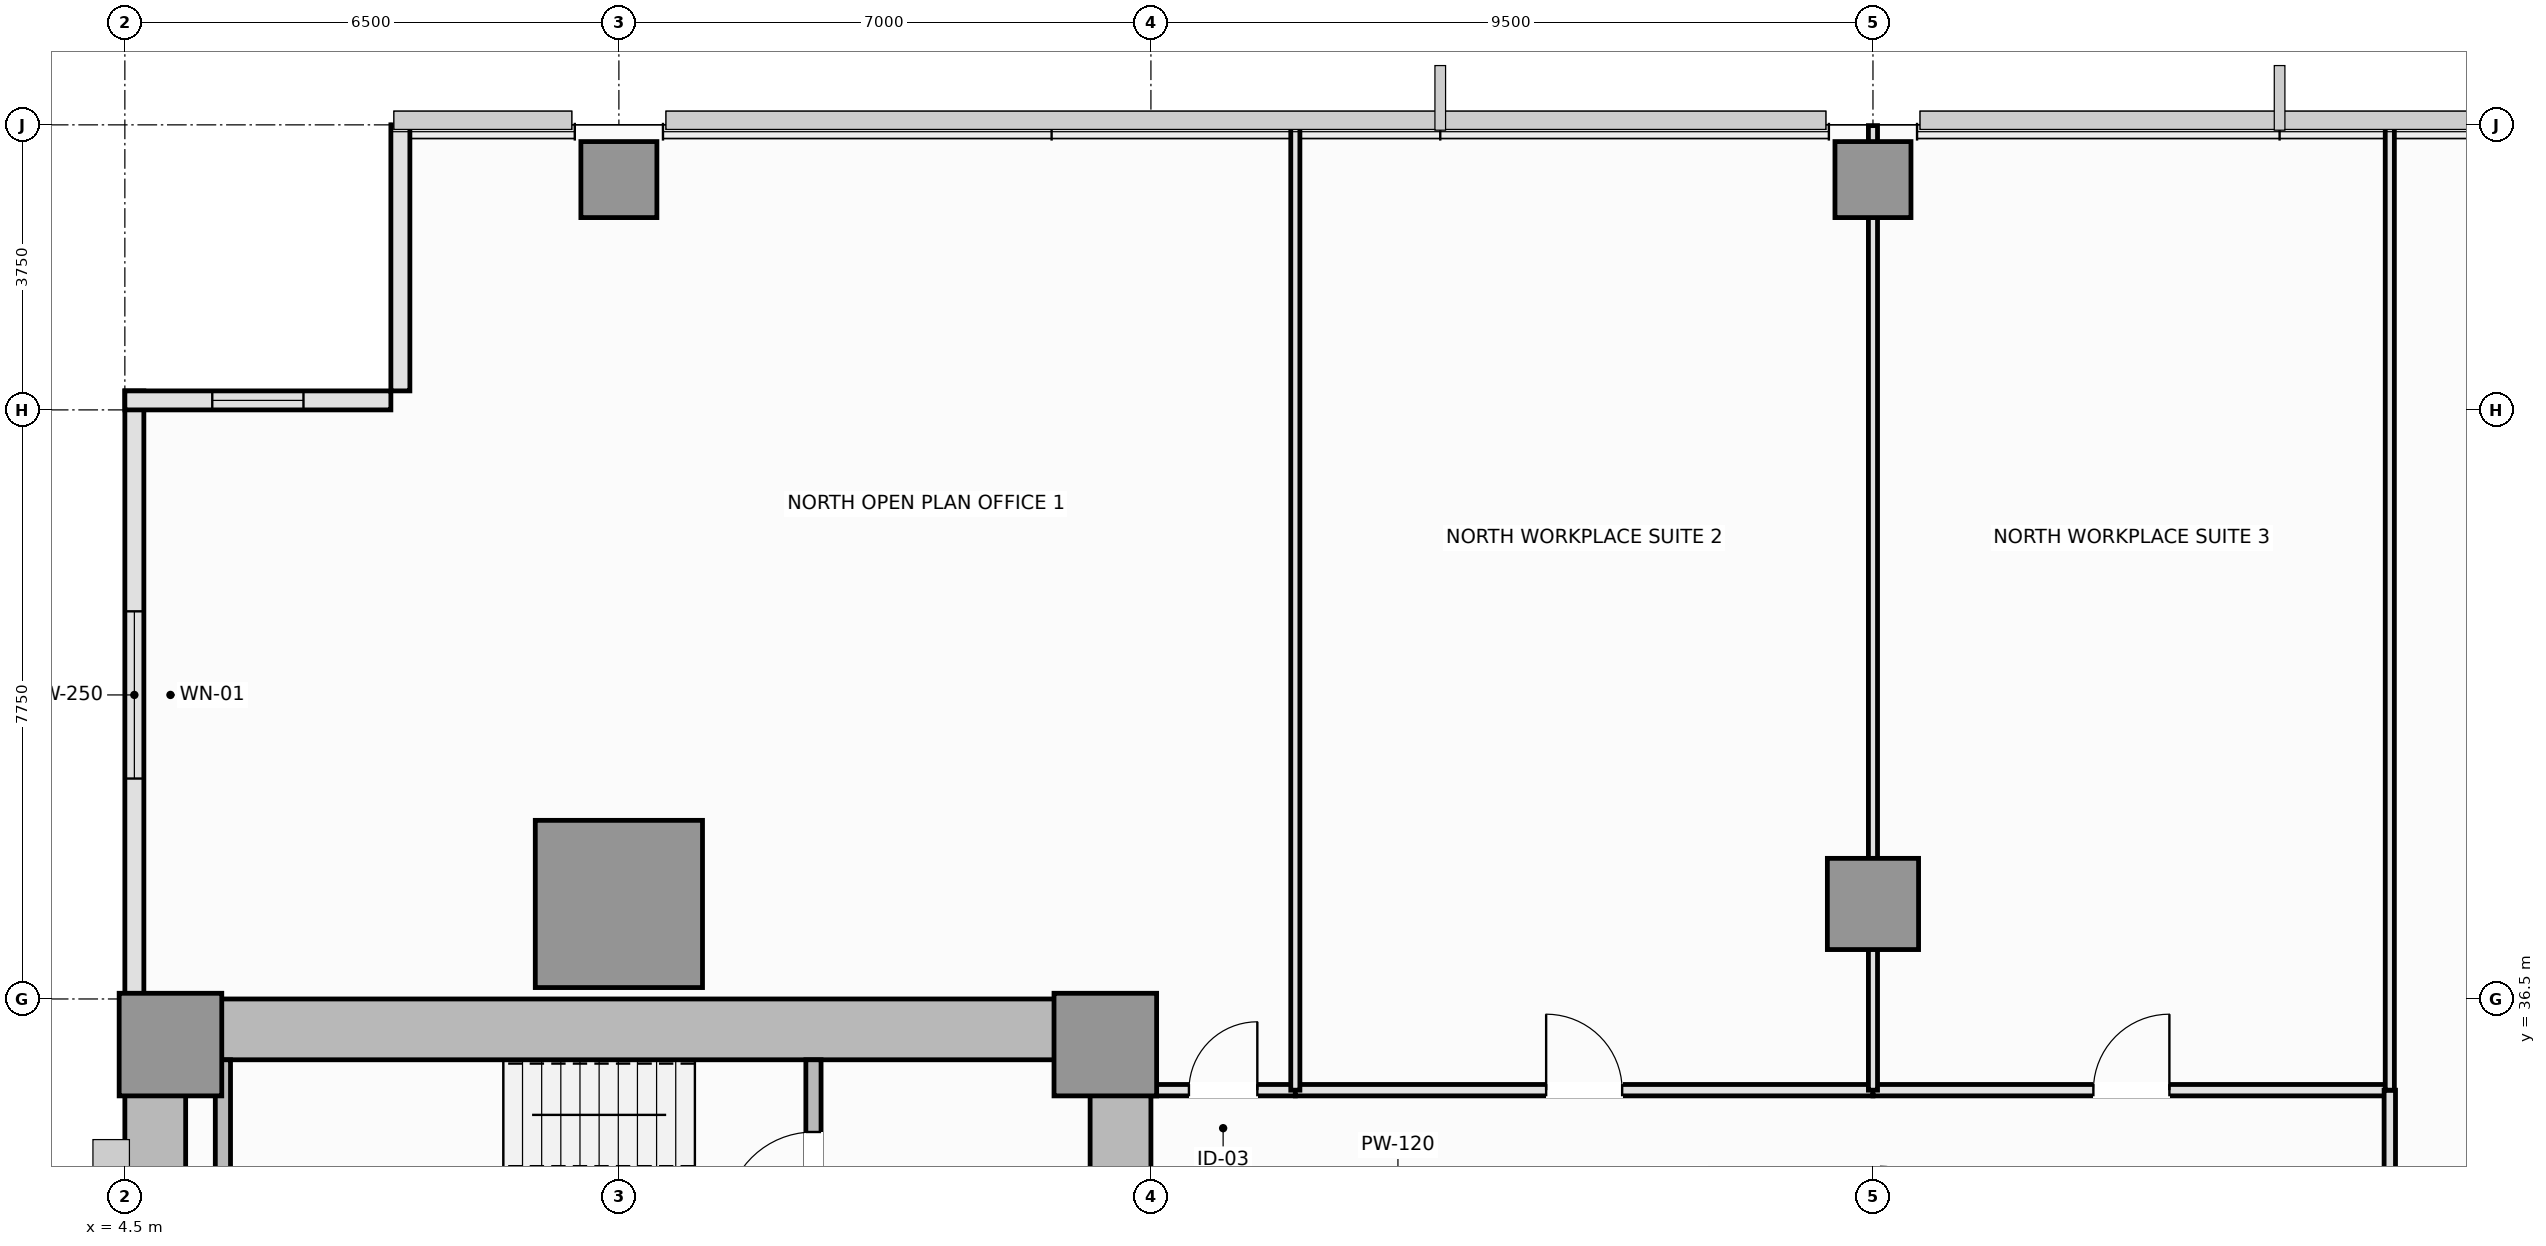
"""IFC4 building model, lengths in metres.
Left out: names, types, materials, properties, quantities, classifications, styles, units other than length and angle.
Written with IfcOpenShell. Run it as: python <this file> out.ifc"""

import sys

from ifc_helpers import new_model, si_unit, direction, frame, frame_2d, origin, origin_2d, place, context, subcontext, project, spatial, rectangle, extrude, element, fill, save


model = new_model("IFC4")
c1 = context("Model", 3, precision=1e-05, world=origin(), true_north=direction((0.0, 1.0)))
c2 = subcontext(c1, "Body", "Model", "MODEL_VIEW")
j1 = project(units=[si_unit("LENGTHUNIT", "METRE"), si_unit("PLANEANGLEUNIT", "RADIAN")], contexts=[c1])
p1 = place(None, origin())
s1 = spatial("IfcSite", under=j1, at=p1, CompositionType="ELEMENT")
p2 = place(p1, origin())
s2 = spatial("IfcBuilding", under=s1, at=p2, CompositionType="ELEMENT")
p3 = place(p2, frame((0.0, 0.0, 36.25)))
s3 = spatial("IfcBuildingStorey", under=s2, at=p3, CompositionType="ELEMENT", Elevation=36.25)
p4 = place(p3, frame((4.5, 36.1, 0.0), z_axis=(0.0, 0.0, 1.0), x_axis=(1.0, 0.0, 0.0)))
e1 = element("IfcWall", 1, at=p4, inside=s3, PredefinedType="SHEAR", context=c2, shape_type="SweptSolid", body=[
    extrude(rectangle(XDim=13.5, YDim=0.8, at=frame_2d((6.75, 0.0))), origin(), (0.0, 0.0, 1.0), 3.55),
])
p5 = place(p3, frame((4.9, 14.8, 0.0), z_axis=(0.0, 0.0, 1.0), x_axis=(0.0, 1.0, 0.0)))
e2 = element("IfcWall", 2, at=p5, inside=s3, PredefinedType="SHEAR", context=c2, shape_type="SweptSolid", body=[
    extrude(rectangle(XDim=20.9, YDim=0.8, at=frame_2d((10.45, 0.0))), origin(), (0.0, 0.0, 1.0), 3.55),
])
p6 = place(p3, frame((17.6, 27.05, 0.0), z_axis=(0.0, 0.0, 1.0), x_axis=(0.0, 1.0, 0.0)))
e3 = element("IfcWall", 3, at=p6, inside=s3, PredefinedType="SHEAR", context=c2, shape_type="SweptSolid", body=[
    extrude(rectangle(XDim=8.65, YDim=0.8, at=frame_2d((4.325, 0.0))), origin(), (0.0, 0.0, 1.0), 3.55),
])
p7 = place(p6, frame((3.45, 0.0, 0.0)))
e4 = element("IfcOpeningElement", 4, at=p7, cuts=e3, PredefinedType="OPENING", context=c2, shape_type="SweptSolid", body=[
    extrude(rectangle(XDim=1.1, YDim=2.15, at=frame_2d((0.55, 1.075))), frame((0.0, 0.41, 0.0), z_axis=(0.0, -1.0, 0.0), x_axis=(1.0, 0.0, 0.0)), (0.0, 0.0, 1.0), 0.82),
])
for number, where, z_axis, x_axis in (
    (5, (5.1, 35.9, 0.0), (0.0, 0.0, 1.0), (1.0, 0.0, 0.0)),
    (6, (17.4, 35.9, 0.0), (0.0, 0.0, 1.0), (1.0, 0.0, 0.0)),
):
    element("IfcColumn", number, at=place(p3, frame(where, z_axis=z_axis, x_axis=x_axis)), inside=s3, PredefinedType="PILASTER", context=c2, shape_type="SweptSolid", body=[
        extrude(rectangle(XDim=1.35, YDim=1.35, at=origin_2d()), origin(), (0.0, 0.0, 1.0), 3.55),
    ])
p8 = place(p3, frame((11.0, 37.75, 0.0), z_axis=(0.0, 0.0, 1.0), x_axis=(1.0, 0.0, 0.0)))
e7 = element("IfcColumn", 7, at=p8, inside=s3, PredefinedType="COLUMN", context=c2, shape_type="SweptSolid", body=[
    extrude(rectangle(XDim=2.2, YDim=2.2, at=origin_2d()), origin(), (0.0, 0.0, 1.0), 3.55),
])
p9 = place(p3, frame((27.5, 37.75, 0.0), z_axis=(0.0, 0.0, 1.0), x_axis=(1.0, 0.0, 0.0)))
e8 = element("IfcColumn", 8, at=p9, inside=s3, PredefinedType="COLUMN", context=c2, shape_type="SweptSolid", body=[
    extrude(rectangle(XDim=1.2, YDim=1.2, at=origin_2d()), origin(), (0.0, 0.0, 1.0), 3.55),
])
for number, where, z_axis, x_axis in (
    (9, (11.0, 47.28, 0.0), (0.0, 0.0, 1.0), (1.0, 0.0, 0.0)),
    (10, (27.5, 47.28, 0.0), (0.0, 0.0, 1.0), (1.0, 0.0, 0.0)),
):
    element("IfcColumn", number, at=place(p3, frame(where, z_axis=z_axis, x_axis=x_axis)), inside=s3, PredefinedType="COLUMN", context=c2, shape_type="SweptSolid", body=[
        extrude(rectangle(XDim=1.0, YDim=1.0, at=origin_2d()), origin(), (0.0, 0.0, 1.0), 3.55),
    ])
p10 = place(p3, frame((4.625, 44.5, 0.0), z_axis=(0.0, 0.0, 1.0), x_axis=(0.0, -1.0, 0.0)))
e11 = element("IfcWall", 11, at=p10, inside=s3, PredefinedType="SOLIDWALL", context=c2, shape_type="SweptSolid", body=[
    extrude(rectangle(XDim=8.0, YDim=0.25, at=frame_2d((4.0, 0.0))), origin(), (0.0, 0.0, 1.0), 3.37),
])
p11 = place(p10, frame((2.9, 0.0, 0.9)))
e12 = element("IfcOpeningElement", 12, at=p11, cuts=e11, PredefinedType="OPENING", context=c2, shape_type="SweptSolid", body=[
    extrude(rectangle(XDim=2.2, YDim=1.8, at=frame_2d((1.1, 0.9))), frame((0.0, 0.135, 0.0), z_axis=(0.0, -1.0, 0.0), x_axis=(1.0, 0.0, 0.0)), (0.0, 0.0, 1.0), 0.27),
])
p12 = place(p3, frame((8.125, 48.0, 0.0), z_axis=(0.0, 0.0, 1.0), x_axis=(0.0, -1.0, 0.0)))
e13 = element("IfcWall", 13, at=p12, inside=s3, PredefinedType="SOLIDWALL", context=c2, shape_type="SweptSolid", body=[
    extrude(rectangle(XDim=3.5, YDim=0.25, at=frame_2d((1.75, 0.0))), origin(), (0.0, 0.0, 1.0), 3.37),
])
p13 = place(p3, frame((8.0, 44.375, 0.0), z_axis=(0.0, 0.0, 1.0), x_axis=(-1.0, 0.0, 0.0)))
e14 = element("IfcWall", 14, at=p13, inside=s3, PredefinedType="SOLIDWALL", context=c2, shape_type="SweptSolid", body=[
    extrude(rectangle(XDim=3.5, YDim=0.25, at=frame_2d((1.75, 0.0))), origin(), (0.0, 0.0, 1.0), 3.37),
])
p14 = place(p13, frame((1.15, 0.0, 0.9)))
e15 = element("IfcOpeningElement", 15, at=p14, cuts=e14, PredefinedType="OPENING", context=c2, shape_type="SweptSolid", body=[
    extrude(rectangle(XDim=1.2, YDim=1.8, at=frame_2d((0.6, 0.9))), frame((0.0, 0.135, 0.0), z_axis=(0.0, -1.0, 0.0), x_axis=(1.0, 0.0, 0.0)), (0.0, 0.0, 1.0), 0.27),
])
p15 = place(p3, frame((5.79, 32.65, 0.0), z_axis=(0.0, 0.0, 1.0), x_axis=(0.0, 1.0, 0.0)))
e16 = element("IfcWall", 16, at=p15, inside=s3, PredefinedType="SOLIDWALL", context=c2, shape_type="SweptSolid", body=[
    extrude(rectangle(XDim=3.05, YDim=0.2, at=frame_2d((1.525, 0.0))), origin(), (0.0, 0.0, 1.0), 3.55),
])
p16 = place(p3, frame((13.56, 32.65, 0.0), z_axis=(0.0, 0.0, 1.0), x_axis=(0.0, 1.0, 0.0)))
e17 = element("IfcWall", 17, at=p16, inside=s3, PredefinedType="SOLIDWALL", context=c2, shape_type="SweptSolid", body=[
    extrude(rectangle(XDim=3.05, YDim=0.2, at=frame_2d((1.525, 0.0))), origin(), (0.0, 0.0, 1.0), 3.55),
])
p17 = place(p16, frame((0.95, 0.0, 0.0)))
e18 = element("IfcOpeningElement", 18, at=p17, cuts=e17, PredefinedType="OPENING", context=c2, shape_type="SweptSolid", body=[
    extrude(rectangle(XDim=1.15, YDim=2.15, at=frame_2d((0.575, 1.075))), frame((0.0, 0.11, 0.0), z_axis=(0.0, -1.0, 0.0), x_axis=(1.0, 0.0, 0.0)), (0.0, 0.0, 1.0), 0.22),
])
p18 = place(p3, frame((18.0, 35.3, 0.0), z_axis=(0.0, 0.0, 1.0), x_axis=(1.0, 0.0, 0.0)))
e19 = element("IfcWall", 19, at=p18, inside=s3, PredefinedType="PARTITIONING", context=c2, shape_type="SweptSolid", body=[
    extrude(rectangle(XDim=1.9, YDim=0.15, at=frame_2d((0.95, 0.0))), origin(), (0.0, 0.0, 1.0), 3.37),
])
p19 = place(p18, frame((0.5, 0.0, 0.0)))
e20 = element("IfcOpeningElement", 20, at=p19, cuts=e19, PredefinedType="OPENING", context=c2, shape_type="SweptSolid", body=[
    extrude(rectangle(XDim=0.9, YDim=2.1, at=frame_2d((0.45, 1.05))), frame((0.0, 0.085, 0.0), z_axis=(0.0, -1.0, 0.0), x_axis=(1.0, 0.0, 0.0)), (0.0, 0.0, 1.0), 0.17),
])
p20 = place(p3, frame((19.9, 35.3, 0.0), z_axis=(0.0, 0.0, 1.0), x_axis=(1.0, 0.0, 0.0)))
e21 = element("IfcWall", 21, at=p20, inside=s3, PredefinedType="PARTITIONING", context=c2, shape_type="SweptSolid", body=[
    extrude(rectangle(XDim=7.6, YDim=0.15, at=frame_2d((3.8, 0.0))), origin(), (0.0, 0.0, 1.0), 3.37),
])
p21 = place(p20, frame((3.3, 0.0, 0.0)))
e22 = element("IfcOpeningElement", 22, at=p21, cuts=e21, PredefinedType="OPENING", context=c2, shape_type="SweptSolid", body=[
    extrude(rectangle(XDim=1.0, YDim=2.15, at=frame_2d((0.5, 1.075))), frame((0.0, 0.085, 0.0), z_axis=(0.0, -1.0, 0.0), x_axis=(1.0, 0.0, 0.0)), (0.0, 0.0, 1.0), 0.17),
])
p22 = place(p3, frame((27.5, 35.3, 0.0), z_axis=(0.0, 0.0, 1.0), x_axis=(1.0, 0.0, 0.0)))
e23 = element("IfcWall", 23, at=p22, inside=s3, PredefinedType="PARTITIONING", context=c2, shape_type="SweptSolid", body=[
    extrude(rectangle(XDim=6.8, YDim=0.15, at=frame_2d((3.4, 0.0))), origin(), (0.0, 0.0, 1.0), 3.37),
])
p23 = place(p22, frame((2.9, 0.0, 0.0)))
e24 = element("IfcOpeningElement", 24, at=p23, cuts=e23, PredefinedType="OPENING", context=c2, shape_type="SweptSolid", body=[
    extrude(rectangle(XDim=1.0, YDim=2.15, at=frame_2d((0.5, 1.075))), frame((0.0, 0.085, 0.0), z_axis=(0.0, -1.0, 0.0), x_axis=(1.0, 0.0, 0.0)), (0.0, 0.0, 1.0), 0.17),
])
p24 = place(p3, frame((34.3, 33.4, 0.0), z_axis=(0.0, 0.0, 1.0), x_axis=(0.0, 1.0, 0.0)))
e25 = element("IfcWall", 25, at=p24, inside=s3, PredefinedType="PARTITIONING", context=c2, shape_type="SweptSolid", body=[
    extrude(rectangle(XDim=1.9, YDim=0.15, at=frame_2d((0.95, 0.0))), origin(), (0.0, 0.0, 1.0), 3.37),
])
p25 = place(p3, frame((19.9, 35.3, 0.0), z_axis=(0.0, 0.0, 1.0), x_axis=(0.0, 1.0, 0.0)))
e26 = element("IfcWall", 26, at=p25, inside=s3, PredefinedType="PARTITIONING", context=c2, shape_type="SweptSolid", body=[
    extrude(rectangle(XDim=12.69, YDim=0.12, at=frame_2d((6.345, 0.0))), origin(), (0.0, 0.0, 1.0), 3.37),
])
p26 = place(p3, frame((27.5, 35.3, 0.0), z_axis=(0.0, 0.0, 1.0), x_axis=(0.0, 1.0, 0.0)))
e27 = element("IfcWall", 27, at=p26, inside=s3, PredefinedType="PARTITIONING", context=c2, shape_type="SweptSolid", body=[
    extrude(rectangle(XDim=12.69, YDim=0.12, at=frame_2d((6.345, 0.0))), origin(), (0.0, 0.0, 1.0), 2.82),
])
p27 = place(p3, frame((34.3, 35.3, 0.0), z_axis=(0.0, 0.0, 1.0), x_axis=(0.0, 1.0, 0.0)))
e28 = element("IfcWall", 28, at=p27, inside=s3, PredefinedType="PARTITIONING", context=c2, shape_type="SweptSolid", body=[
    extrude(rectangle(XDim=12.69, YDim=0.12, at=frame_2d((6.345, 0.0))), origin(), (0.0, 0.0, 1.0), 3.37),
])
p28 = place(p11, origin())
e29 = element("IfcWindow", 29, at=p28, inside=s3, PartitioningType="SINGLE_PANEL", PredefinedType="WINDOW", context=c2, shape_type="SweptSolid", body=[
    extrude(rectangle(XDim=2.2, YDim=1.8, at=frame_2d((1.1, 0.9))), frame((0.0, 0.03, 0.0), z_axis=(0.0, -1.0, 0.0), x_axis=(1.0, 0.0, 0.0)), (0.0, 0.0, 1.0), 0.06),
])
fill(e12, e29)
p29 = place(p14, origin())
e30 = element("IfcWindow", 30, at=p29, inside=s3, PartitioningType="SINGLE_PANEL", PredefinedType="WINDOW", context=c2, shape_type="SweptSolid", body=[
    extrude(rectangle(XDim=1.2, YDim=1.8, at=frame_2d((0.6, 0.9))), frame((0.0, 0.03, 0.0), z_axis=(0.0, -1.0, 0.0), x_axis=(1.0, 0.0, 0.0)), (0.0, 0.0, 1.0), 0.06),
])
fill(e15, e30)
p30 = place(p17, origin())
e31 = element("IfcDoor", 31, at=p30, inside=s3, OperationType="SINGLE_SWING_LEFT", PredefinedType="DOOR", context=c2, shape_type="SweptSolid", body=[
    extrude(rectangle(XDim=1.15, YDim=2.15, at=frame_2d((0.575, 1.075))), frame((0.0, 0.025, 0.0), z_axis=(0.0, -1.0, 0.0), x_axis=(1.0, 0.0, 0.0)), (0.0, 0.0, 1.0), 0.05),
])
fill(e18, e31)
p31 = place(p19, origin())
e32 = element("IfcDoor", 32, at=p31, inside=s3, OperationType="SINGLE_SWING_RIGHT", PredefinedType="DOOR", context=c2, shape_type="SweptSolid", body=[
    extrude(rectangle(XDim=0.9, YDim=2.1, at=frame_2d((0.45, 1.05))), frame((0.0, 0.025, 0.0), z_axis=(0.0, -1.0, 0.0), x_axis=(1.0, 0.0, 0.0)), (0.0, 0.0, 1.0), 0.05),
])
fill(e20, e32)
p32 = place(p21, origin())
e33 = element("IfcDoor", 33, at=p32, inside=s3, OperationType="SINGLE_SWING_LEFT", PredefinedType="DOOR", context=c2, shape_type="SweptSolid", body=[
    extrude(rectangle(XDim=1.0, YDim=2.15, at=frame_2d((0.5, 1.075))), frame((0.0, 0.025, 0.0), z_axis=(0.0, -1.0, 0.0), x_axis=(1.0, 0.0, 0.0)), (0.0, 0.0, 1.0), 0.05),
])
fill(e22, e33)
p33 = place(p23, origin())
e34 = element("IfcDoor", 34, at=p33, inside=s3, OperationType="SINGLE_SWING_RIGHT", PredefinedType="DOOR", context=c2, shape_type="SweptSolid", body=[
    extrude(rectangle(XDim=1.0, YDim=2.15, at=frame_2d((0.5, 1.075))), frame((0.0, 0.025, 0.0), z_axis=(0.0, -1.0, 0.0), x_axis=(1.0, 0.0, 0.0)), (0.0, 0.0, 1.0), 0.05),
])
fill(e24, e34)
save(model, sys.argv[1])
